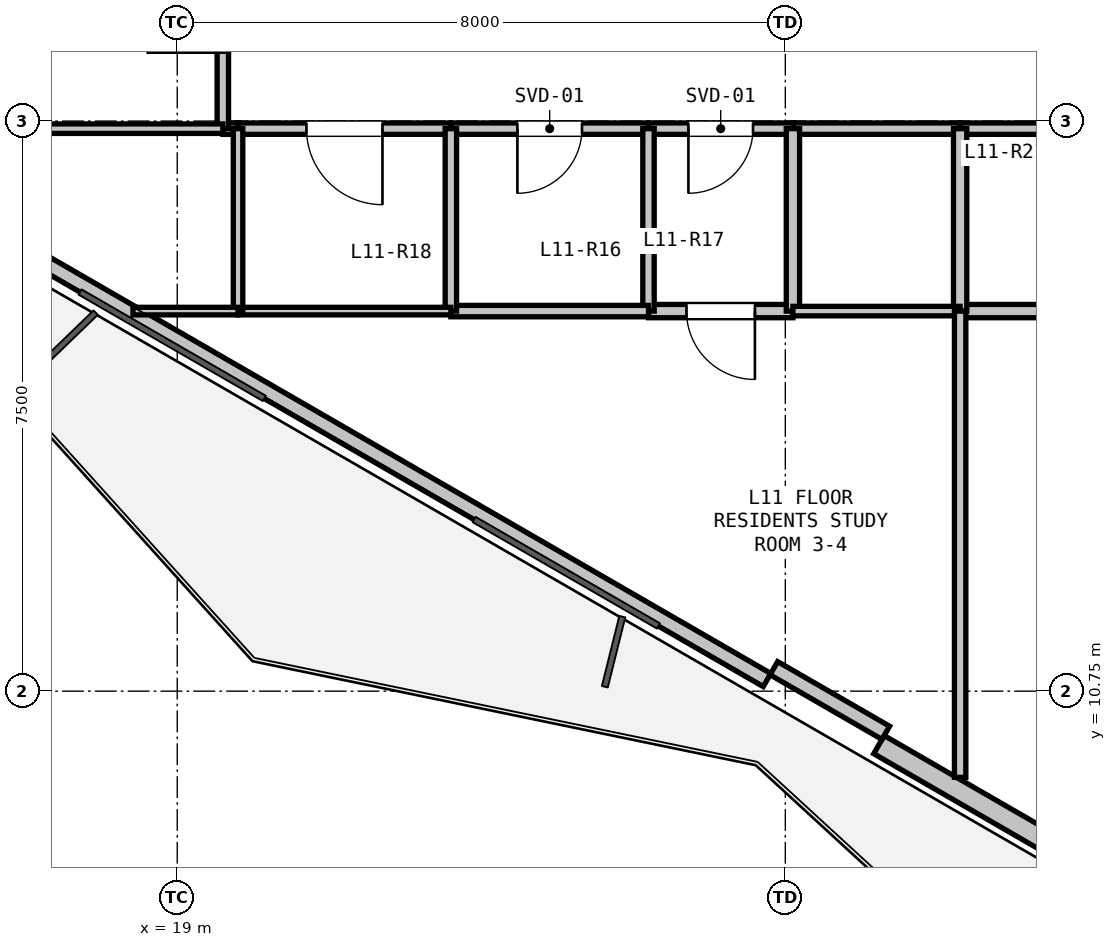
"""IFC4 building model, lengths in metres.
Left out: names, types, materials, properties, quantities, classifications, styles, units other than length and angle.
Written with IfcOpenShell. Run it as: python <this file> out.ifc"""

import sys

from ifc_helpers import new_model, si_unit, direction, frame, frame_2d, origin, place, context, subcontext, project, spatial, rectangle, extrude, element, fill, save


model = new_model("IFC4")
c1 = context("Model", 3, precision=1e-05, world=origin(), true_north=direction((0.0, 1.0)))
c2 = subcontext(c1, "Body", "Model", "MODEL_VIEW")
j1 = project(units=[si_unit("LENGTHUNIT", "METRE"), si_unit("PLANEANGLEUNIT", "RADIAN")], contexts=[c1])
p1 = place(None, origin())
s1 = spatial("IfcSite", under=j1, at=p1, CompositionType="ELEMENT")
p2 = place(p1, origin())
s2 = spatial("IfcBuilding", under=s1, at=p2, CompositionType="ELEMENT")
p3 = place(p2, frame((0.0, 0.0, 42.3)))
s3 = spatial("IfcBuildingStorey", under=s2, at=p3, CompositionType="ELEMENT", Elevation=42.3)
p4 = place(p3, frame((39.207, 3.71, 0.0), z_axis=(0.0, 0.0, 1.0), x_axis=(-0.86603192154, 0.499988710747, 0.0)))
e1 = element("IfcWall", 1, at=p4, inside=s3, PredefinedType="SOLIDWALL", context=c2, shape_type="SweptSolid", body=[
    extrude(rectangle(XDim=12.673, YDim=0.275, at=frame_2d((6.336, 0.0))), origin(), (0.0, 0.0, 1.0), 2.66),
])
p5 = place(p4, frame((8.136, 0.0, 0.0)))
e2 = element("IfcOpeningElement", 2, at=p5, cuts=e1, PredefinedType="OPENING", context=c2, shape_type="SweptSolid", body=[
    extrude(rectangle(XDim=1.0, YDim=2.1, at=frame_2d((0.5, 1.05))), frame((0.0, 0.147, 0.0), z_axis=(0.0, -1.0, 0.0), x_axis=(1.0, 0.0, 0.0)), (0.0, 0.0, 1.0), 0.295),
])
p6 = place(p4, frame((2.518, 0.0, 0.9)))
e3 = element("IfcOpeningElement", 3, at=p6, cuts=e1, PredefinedType="OPENING", context=c2, shape_type="SweptSolid", body=[
    extrude(rectangle(XDim=1.2, YDim=1.4, at=frame_2d((0.6, 0.7))), frame((0.0, 0.147, 0.0), z_axis=(0.0, -1.0, 0.0), x_axis=(1.0, 0.0, 0.0)), (0.0, 0.0, 1.0), 0.295),
])
p7 = place(p3, frame((26.76, 10.896, 0.0), z_axis=(0.0, 0.0, 1.0), x_axis=(-0.866027351828, 0.499996625875, 0.0)))
e4 = element("IfcWall", 4, at=p7, inside=s3, PredefinedType="PARAPET", context=c2, shape_type="SweptSolid", body=[
    extrude(rectangle(XDim=11.973, YDim=0.2, at=frame_2d((5.987, 0.0))), origin(), (0.0, 0.0, 1.0), 0.2),
])
p8 = place(p3, frame((28.322, 10.202, 0.0), z_axis=(0.0, 0.0, 1.0), x_axis=(-0.86605165483, 0.499954529098, 0.0)))
e5 = element("IfcWall", 5, at=p8, inside=s3, PredefinedType="PARAPET", context=c2, shape_type="SweptSolid", body=[
    extrude(rectangle(XDim=1.7, YDim=0.2, at=frame_2d((0.85, 0.0))), origin(), (0.0, 0.0, 1.0), 2.66),
])
p9 = place(p3, frame((31.3, 18.15, 0.0), z_axis=(0.0, 0.0, 1.0), x_axis=(-1.0, 0.0, 0.0)))
e6 = element("IfcWall", 6, at=p9, inside=s3, PredefinedType="PARTITIONING", context=c2, shape_type="SweptSolid", body=[
    extrude(rectangle(XDim=2.0, YDim=0.15, at=frame_2d((1.0, 0.0))), origin(), (0.0, 0.0, 1.0), 3.04),
])
p10 = place(p3, frame((29.3, 18.15, 0.0), z_axis=(0.0, 0.0, 1.0), x_axis=(-1.0, 0.0, 0.0)))
e7 = element("IfcWall", 7, at=p10, inside=s3, PredefinedType="PARTITIONING", context=c2, shape_type="SweptSolid", body=[
    extrude(rectangle(XDim=2.2, YDim=0.15, at=frame_2d((1.1, 0.0))), origin(), (0.0, 0.0, 1.0), 3.04),
])
p11 = place(p3, frame((27.1, 18.15, 0.0), z_axis=(0.0, 0.0, 1.0), x_axis=(-1.0, 0.0, 0.0)))
e8 = element("IfcWall", 8, at=p11, inside=s3, PredefinedType="PARTITIONING", context=c2, shape_type="SweptSolid", body=[
    extrude(rectangle(XDim=1.9, YDim=0.15, at=frame_2d((0.95, 0.0))), origin(), (0.0, 0.0, 1.0), 3.04),
])
p12 = place(p11, frame((0.525, 0.0, 0.0)))
e9 = element("IfcOpeningElement", 9, at=p12, cuts=e8, PredefinedType="OPENING", context=c2, shape_type="SweptSolid", body=[
    extrude(rectangle(XDim=0.85, YDim=2.1, at=frame_2d((0.425, 1.05))), frame((0.0, 0.085, 0.0), z_axis=(0.0, -1.0, 0.0), x_axis=(1.0, 0.0, 0.0)), (0.0, 0.0, 1.0), 0.17),
])
p13 = place(p3, frame((25.2, 18.15, 0.0), z_axis=(0.0, 0.0, 1.0), x_axis=(-1.0, 0.0, 0.0)))
e10 = element("IfcWall", 10, at=p13, inside=s3, PredefinedType="PARTITIONING", context=c2, shape_type="SweptSolid", body=[
    extrude(rectangle(XDim=2.6, YDim=0.15, at=frame_2d((1.3, 0.0))), origin(), (0.0, 0.0, 1.0), 2.337),
])
p14 = place(p13, frame((0.875, 0.0, 0.0)))
e11 = element("IfcOpeningElement", 11, at=p14, cuts=e10, PredefinedType="OPENING", context=c2, shape_type="SweptSolid", body=[
    extrude(rectangle(XDim=0.85, YDim=2.1, at=frame_2d((0.425, 1.05))), frame((0.0, 0.085, 0.0), z_axis=(0.0, -1.0, 0.0), x_axis=(1.0, 0.0, 0.0)), (0.0, 0.0, 1.0), 0.17),
])
p15 = place(p3, frame((22.6, 18.15, 0.0), z_axis=(0.0, 0.0, 1.0), x_axis=(-1.0, 0.0, 0.0)))
e12 = element("IfcWall", 12, at=p15, inside=s3, PredefinedType="PARTITIONING", context=c2, shape_type="SweptSolid", body=[
    extrude(rectangle(XDim=2.8, YDim=0.15, at=frame_2d((1.4, 0.0))), origin(), (0.0, 0.0, 1.0), 3.04),
])
p16 = place(p15, frame((0.9, 0.0, 0.0)))
e13 = element("IfcOpeningElement", 13, at=p16, cuts=e12, PredefinedType="OPENING", context=c2, shape_type="SweptSolid", body=[
    extrude(rectangle(XDim=1.0, YDim=2.15, at=frame_2d((0.5, 1.075))), frame((0.0, 0.085, 0.0), z_axis=(0.0, -1.0, 0.0), x_axis=(1.0, 0.0, 0.0)), (0.0, 0.0, 1.0), 0.17),
])
p17 = place(p3, frame((19.8, 18.15, 0.0), z_axis=(0.0, 0.0, 1.0), x_axis=(-1.0, 0.0, 0.0)))
e14 = element("IfcWall", 14, at=p17, inside=s3, PredefinedType="PARTITIONING", context=c2, shape_type="SweptSolid", body=[
    extrude(rectangle(XDim=0.2, YDim=0.15, at=frame_2d((0.1, 0.0))), origin(), (0.0, 0.0, 1.0), 3.04),
])
p18 = place(p3, frame((19.6, 18.15, 0.0), z_axis=(0.0, 0.0, 1.0), x_axis=(0.0, 1.0, 0.0)))
e15 = element("IfcWall", 15, at=p18, inside=s3, PredefinedType="PARTITIONING", context=c2, shape_type="SweptSolid", body=[
    extrude(rectangle(XDim=3.0, YDim=0.15, at=frame_2d((1.5, 0.0))), origin(), (0.0, 0.0, 1.0), 2.337),
])
p19 = place(p18, frame((1.0, 0.0, 0.0)))
e16 = element("IfcOpeningElement", 16, at=p19, cuts=e15, PredefinedType="OPENING", context=c2, shape_type="SweptSolid", body=[
    extrude(rectangle(XDim=1.0, YDim=2.15, at=frame_2d((0.5, 1.075))), frame((0.0, 0.085, 0.0), z_axis=(0.0, -1.0, 0.0), x_axis=(1.0, 0.0, 0.0)), (0.0, 0.0, 1.0), 0.17),
])
p20 = place(p3, frame((27.1, 15.75, 0.0), z_axis=(0.0, 0.0, 1.0), x_axis=(-1.0, 0.0, 0.0)))
e17 = element("IfcWall", 17, at=p20, inside=s3, PredefinedType="PLUMBINGWALL", context=c2, shape_type="SweptSolid", body=[
    extrude(rectangle(XDim=1.9, YDim=0.175, at=frame_2d((0.95, 0.0))), origin(), (0.0, 0.0, 1.0), 2.337),
])
p21 = place(p20, frame((0.5, 0.0, 0.0)))
e18 = element("IfcOpeningElement", 18, at=p21, cuts=e17, PredefinedType="OPENING", context=c2, shape_type="SweptSolid", body=[
    extrude(rectangle(XDim=0.9, YDim=2.1, at=frame_2d((0.45, 1.05))), frame((0.0, 0.097, 0.0), z_axis=(0.0, -1.0, 0.0), x_axis=(1.0, 0.0, 0.0)), (0.0, 0.0, 1.0), 0.195),
])
p22 = place(p3, frame((25.2, 15.75, 0.0), z_axis=(0.0, 0.0, 1.0), x_axis=(0.0, 1.0, 0.0)))
e19 = element("IfcWall", 19, at=p22, inside=s3, PredefinedType="PARTITIONING", context=c2, shape_type="SweptSolid", body=[
    extrude(rectangle(XDim=2.4, YDim=0.15, at=frame_2d((1.2, 0.0))), origin(), (0.0, 0.0, 1.0), 2.337),
])
p23 = place(p3, frame((27.1, 18.15, 0.0), z_axis=(0.0, 0.0, 1.0), x_axis=(0.0, -1.0, 0.0)))
e20 = element("IfcWall", 20, at=p23, inside=s3, PredefinedType="PLUMBINGWALL", context=c2, shape_type="SweptSolid", body=[
    extrude(rectangle(XDim=2.4, YDim=0.175, at=frame_2d((1.2, 0.0))), origin(), (0.0, 0.0, 1.0), 3.04),
])
p24 = place(p3, frame((31.3, 15.75, 0.0), z_axis=(0.0, 0.0, 1.0), x_axis=(-1.0, 0.0, 0.0)))
e21 = element("IfcWall", 21, at=p24, inside=s3, PredefinedType="PLUMBINGWALL", context=c2, shape_type="SweptSolid", body=[
    extrude(rectangle(XDim=2.0, YDim=0.175, at=frame_2d((1.0, 0.0))), origin(), (0.0, 0.0, 1.0), 3.04),
])
p25 = place(p3, frame((29.3, 15.75, 0.0), z_axis=(0.0, 0.0, 1.0), x_axis=(0.0, 1.0, 0.0)))
e22 = element("IfcWall", 22, at=p25, inside=s3, PredefinedType="PLUMBINGWALL", context=c2, shape_type="SweptSolid", body=[
    extrude(rectangle(XDim=2.4, YDim=0.175, at=frame_2d((1.2, 0.0))), origin(), (0.0, 0.0, 1.0), 3.04),
])
p26 = place(p3, frame((19.6, 18.15, 0.0), z_axis=(0.0, 0.0, 1.0), x_axis=(-1.0, 0.0, 0.0)))
e23 = element("IfcWall", 23, at=p26, inside=s3, PredefinedType="PARTITIONING", context=c2, shape_type="SweptSolid", body=[
    extrude(rectangle(XDim=2.45, YDim=0.125, at=frame_2d((1.225, 0.0))), origin(), (0.0, 0.0, 1.0), 3.04),
])
p27 = place(p3, frame((25.2, 15.75, 0.0), z_axis=(0.0, 0.0, 1.0), x_axis=(-1.0, 0.0, 0.0)))
e24 = element("IfcWall", 24, at=p27, inside=s3, PredefinedType="PARTITIONING", context=c2, shape_type="SweptSolid", body=[
    extrude(rectangle(XDim=2.6, YDim=0.15, at=frame_2d((1.3, 0.0))), origin(), (0.0, 0.0, 1.0), 3.04),
])
p28 = place(p3, frame((22.6, 15.75, 0.0), z_axis=(0.0, 0.0, 1.0), x_axis=(0.0, 1.0, 0.0)))
e25 = element("IfcWall", 25, at=p28, inside=s3, PredefinedType="PARTITIONING", context=c2, shape_type="SweptSolid", body=[
    extrude(rectangle(XDim=2.4, YDim=0.15, at=frame_2d((1.2, 0.0))), origin(), (0.0, 0.0, 1.0), 3.04),
])
p29 = place(p3, frame((22.6, 15.75, 0.0), z_axis=(0.0, 0.0, 1.0), x_axis=(-1.0, 0.0, 0.0)))
e26 = element("IfcWall", 26, at=p29, inside=s3, PredefinedType="PARTITIONING", context=c2, shape_type="SweptSolid", body=[
    extrude(rectangle(XDim=2.8, YDim=0.1, at=frame_2d((1.4, 0.0))), origin(), (0.0, 0.0, 1.0), 2.65),
])
p30 = place(p3, frame((19.8, 15.75, 0.0), z_axis=(0.0, 0.0, 1.0), x_axis=(0.0, 1.0, 0.0)))
e27 = element("IfcWall", 27, at=p30, inside=s3, PredefinedType="PARTITIONING", context=c2, shape_type="SweptSolid", body=[
    extrude(rectangle(XDim=2.4, YDim=0.125, at=frame_2d((1.2, 0.0))), origin(), (0.0, 0.0, 1.0), 2.65),
])
p31 = place(p3, frame((18.418, 15.75, 0.0), z_axis=(0.0, 0.0, 1.0), x_axis=(1.0, 0.0, 0.0)))
e28 = element("IfcWall", 28, at=p31, inside=s3, PredefinedType="PARTITIONING", context=c2, shape_type="SweptSolid", body=[
    extrude(rectangle(XDim=1.382, YDim=0.1, at=frame_2d((0.691, 0.0))), origin(), (0.0, 0.0, 1.0), 2.365),
])
p32 = place(p3, frame((27.1, 15.75, 0.0), z_axis=(0.0, 0.0, 1.0), x_axis=(1.0, 0.0, 0.0)))
e29 = element("IfcWall", 29, at=p32, inside=s3, PredefinedType="PARTITIONING", context=c2, shape_type="SweptSolid", body=[
    extrude(rectangle(XDim=2.2, YDim=0.125, at=frame_2d((1.1, 0.0))), origin(), (0.0, 0.0, 1.0), 3.04),
])
p33 = place(p3, frame((29.3, 15.75, 0.0), z_axis=(0.0, 0.0, 1.0), x_axis=(0.0, -1.0, 0.0)))
e30 = element("IfcWall", 30, at=p33, inside=s3, PredefinedType="PARTITIONING", context=c2, shape_type="SweptSolid", body=[
    extrude(rectangle(XDim=6.134, YDim=0.15, at=frame_2d((3.067, 0.0))), origin(), (0.0, 0.0, 1.0), 2.337),
])
p34 = place(p12, origin())
e31 = element("IfcDoor", 31, at=p34, inside=s3, OperationType="SINGLE_SWING_RIGHT", PredefinedType="DOOR", context=c2, shape_type="SweptSolid", body=[
    extrude(rectangle(XDim=0.85, YDim=2.1, at=frame_2d((0.425, 1.05))), frame((0.0, 0.025, 0.0), z_axis=(0.0, -1.0, 0.0), x_axis=(1.0, 0.0, 0.0)), (0.0, 0.0, 1.0), 0.05),
])
fill(e9, e31)
p35 = place(p14, origin())
e32 = element("IfcDoor", 32, at=p35, inside=s3, OperationType="SINGLE_SWING_RIGHT", PredefinedType="DOOR", context=c2, shape_type="SweptSolid", body=[
    extrude(rectangle(XDim=0.85, YDim=2.1, at=frame_2d((0.425, 1.05))), frame((0.0, 0.025, 0.0), z_axis=(0.0, -1.0, 0.0), x_axis=(1.0, 0.0, 0.0)), (0.0, 0.0, 1.0), 0.05),
])
fill(e11, e32)
p36 = place(p16, origin())
e33 = element("IfcDoor", 33, at=p36, inside=s3, OperationType="SINGLE_SWING_LEFT", PredefinedType="DOOR", context=c2, shape_type="SweptSolid", body=[
    extrude(rectangle(XDim=1.0, YDim=2.15, at=frame_2d((0.5, 1.075))), frame((0.0, 0.025, 0.0), z_axis=(0.0, -1.0, 0.0), x_axis=(1.0, 0.0, 0.0)), (0.0, 0.0, 1.0), 0.05),
])
fill(e13, e33)
p37 = place(p21, origin())
e34 = element("IfcDoor", 34, at=p37, inside=s3, OperationType="SINGLE_SWING_LEFT", PredefinedType="DOOR", context=c2, shape_type="SweptSolid", body=[
    extrude(rectangle(XDim=0.9, YDim=2.1, at=frame_2d((0.45, 1.05))), frame((0.0, 0.025, 0.0), z_axis=(0.0, -1.0, 0.0), x_axis=(1.0, 0.0, 0.0)), (0.0, 0.0, 1.0), 0.05),
])
fill(e18, e34)
save(model, sys.argv[1])
